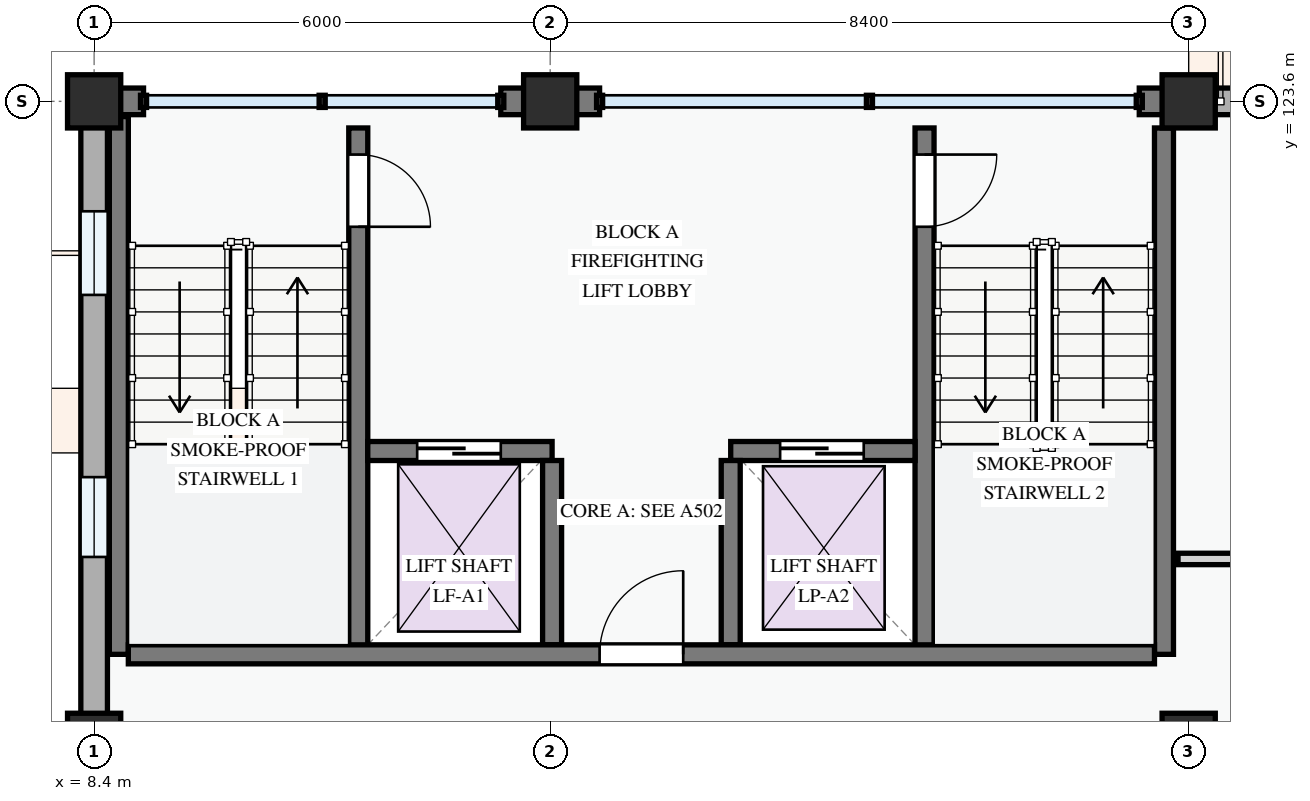
"""IFC4 building model, lengths in metres.
Left out: names, types, materials, properties, quantities, classifications, styles, units other than length and angle.
Written with IfcOpenShell. Run it as: python <this file> out.ifc"""

import sys

from ifc_helpers import new_model, si_unit, direction, frame, frame_2d, origin, origin_2d, place, context, subcontext, project, spatial, rectangle, extrude, element, fill, save


model = new_model("IFC4")
c1 = context("Model", 3, precision=1e-05, world=origin(), true_north=direction((0.0, 1.0)))
c2 = subcontext(c1, "Body", "Model", "MODEL_VIEW")
j1 = project(units=[si_unit("LENGTHUNIT", "METRE"), si_unit("PLANEANGLEUNIT", "RADIAN")], contexts=[c1])
p1 = place(None, origin())
s1 = spatial("IfcSite", under=j1, at=p1, CompositionType="ELEMENT")
p2 = place(p1, origin())
s2 = spatial("IfcBuilding", under=s1, at=p2, CompositionType="ELEMENT")
p3 = place(p2, frame((0.0, 0.0, 14.7)))
s3 = spatial("IfcBuildingStorey", under=s2, at=p3, CompositionType="ELEMENT", Elevation=14.7)
for number, where, z_axis, x_axis in (
    (1, (8.4, 115.2, 0.0), (0.0, 0.0, 1.0), (1.0, 0.0, 0.0)),
    (2, (8.4, 123.6, 0.0), (0.0, 0.0, 1.0), (1.0, 0.0, 0.0)),
    (3, (14.4, 123.6, 0.0), (0.0, 0.0, 1.0), (1.0, 0.0, 0.0)),
    (4, (22.8, 115.2, 0.0), (0.0, 0.0, 1.0), (1.0, 0.0, 0.0)),
    (5, (22.8, 123.6, 0.0), (0.0, 0.0, 1.0), (1.0, 0.0, 0.0)),
):
    element("IfcColumn", number, at=place(p3, frame(where, z_axis=z_axis, x_axis=x_axis)), inside=s3, PredefinedType="COLUMN", context=c2, shape_type="SweptSolid", body=[
        extrude(rectangle(XDim=0.7, YDim=0.7, at=origin_2d()), origin(), (0.0, 0.0, 1.0), 3.3),
    ])
p4 = place(p3, frame((28.8, 123.6, 0.0), z_axis=(0.0, 0.0, 1.0), x_axis=(-1.0, 0.0, 0.0)))
e6 = element("IfcWall", 6, at=p4, inside=s3, PredefinedType="STANDARD", context=c2, shape_type="SweptSolid", body=[
    extrude(rectangle(XDim=6.0, YDim=0.35, at=frame_2d((3.0, 0.0))), origin(), (0.0, 0.0, 1.0), 2.445),
])
p5 = place(p4, frame((0.62, 0.0, 0.0)))
e7 = element("IfcOpeningElement", 7, at=p5, cuts=e6, PredefinedType="OPENING", context=c2, shape_type="SweptSolid", body=[
    extrude(rectangle(XDim=1.1, YDim=2.15, at=frame_2d((0.55, 1.075))), frame((0.0, 0.185, 0.0), z_axis=(0.0, -1.0, 0.0), x_axis=(1.0, 0.0, 0.0)), (0.0, 0.0, 1.0), 0.37),
])
p6 = place(p4, frame((2.95, 0.0, 0.78)))
e8 = element("IfcOpeningElement", 8, at=p6, cuts=e6, PredefinedType="OPENING", context=c2, shape_type="SweptSolid", body=[
    extrude(rectangle(XDim=1.68, YDim=1.46, at=frame_2d((0.84, 0.73))), frame((0.0, 0.185, 0.0), z_axis=(0.0, -1.0, 0.0), x_axis=(1.0, 0.0, 0.0)), (0.0, 0.0, 1.0), 0.37),
])
for number, where, z_axis, x_axis in (
    (9, (22.8, 123.6, 0.0), (0.0, 0.0, 1.0), (-1.0, 0.0, 0.0)),
    (10, (15.05, 123.6, 0.0), (0.0, 0.0, 1.0), (-1.0, 0.0, 0.0)),
):
    element("IfcWall", number, at=place(p3, frame(where, z_axis=z_axis, x_axis=x_axis)), inside=s3, PredefinedType="STANDARD", context=c2, shape_type="SweptSolid", body=[
        extrude(rectangle(XDim=0.65, YDim=0.35, at=frame_2d((0.325, 0.0))), origin(), (0.0, 0.0, 1.0), 3.04),
    ])
p7 = place(p3, frame((14.4, 123.6, 0.0), z_axis=(0.0, 0.0, 1.0), x_axis=(-1.0, 0.0, 0.0)))
e11 = element("IfcWall", 11, at=p7, inside=s3, PredefinedType="STANDARD", context=c2, shape_type="SweptSolid", body=[
    extrude(rectangle(XDim=0.65, YDim=0.35, at=frame_2d((0.325, 0.0))), origin(), (0.0, 0.0, 1.0), 3.04),
])
p8 = place(p3, frame((9.05, 123.6, 0.0), z_axis=(0.0, 0.0, 1.0), x_axis=(-1.0, 0.0, 0.0)))
e12 = element("IfcWall", 12, at=p8, inside=s3, PredefinedType="STANDARD", context=c2, shape_type="SweptSolid", body=[
    extrude(rectangle(XDim=0.473, YDim=0.35, at=frame_2d((0.237, 0.0))), origin(), (0.0, 0.0, 1.0), 3.04),
])
p9 = place(p3, frame((8.4, 123.6, 0.0), z_axis=(0.0, 0.0, 1.0), x_axis=(0.0, -1.0, 0.0)))
e13 = element("IfcWall", 13, at=p9, inside=s3, PredefinedType="STANDARD", context=c2, shape_type="SweptSolid", body=[
    extrude(rectangle(XDim=8.4, YDim=0.35, at=frame_2d((4.2, 0.0))), origin(), (0.0, 0.0, 1.0), 2.345),
])
p10 = place(p9, frame((1.446, 0.0, 0.78)))
e14 = element("IfcOpeningElement", 14, at=p10, cuts=e13, PredefinedType="OPENING", context=c2, shape_type="SweptSolid", body=[
    extrude(rectangle(XDim=1.1, YDim=1.3, at=frame_2d((0.55, 0.65))), frame((0.0, 0.185, 0.0), z_axis=(0.0, -1.0, 0.0), x_axis=(1.0, 0.0, 0.0)), (0.0, 0.0, 1.0), 0.37),
])
p11 = place(p9, frame((4.944, 0.0, 0.78)))
e15 = element("IfcOpeningElement", 15, at=p11, cuts=e13, PredefinedType="OPENING", context=c2, shape_type="SweptSolid", body=[
    extrude(rectangle(XDim=1.05, YDim=1.2, at=frame_2d((0.525, 0.6))), frame((0.0, 0.185, 0.0), z_axis=(0.0, -1.0, 0.0), x_axis=(1.0, 0.0, 0.0)), (0.0, 0.0, 1.0), 0.37),
])
p12 = place(p3, frame((11.875, 123.25, 0.0), z_axis=(0.0, 0.0, 1.0), x_axis=(0.0, -1.0, 0.0)))
e16 = element("IfcWall", 16, at=p12, inside=s3, PredefinedType="SHEAR", context=c2, shape_type="SweptSolid", body=[
    extrude(rectangle(XDim=6.925, YDim=0.25, at=frame_2d((3.462, 0.0))), origin(), (0.0, 0.0, 1.0), 3.0),
])
p13 = place(p12, frame((0.35, 0.0, 0.0)))
e17 = element("IfcOpeningElement", 17, at=p13, cuts=e16, PredefinedType="OPENING", context=c2, shape_type="SweptSolid", body=[
    extrude(rectangle(XDim=0.95, YDim=2.1, at=frame_2d((0.475, 1.05))), frame((0.0, 0.135, 0.0), z_axis=(0.0, -1.0, 0.0), x_axis=(1.0, 0.0, 0.0)), (0.0, 0.0, 1.0), 0.27),
])
p14 = place(p3, frame((8.725, 123.4, 0.0), z_axis=(0.0, 0.0, 1.0), x_axis=(0.0, -1.0, 0.0)))
e18 = element("IfcWall", 18, at=p14, inside=s3, PredefinedType="SHEAR", context=c2, shape_type="SweptSolid", body=[
    extrude(rectangle(XDim=7.075, YDim=0.25, at=frame_2d((3.538, 0.0))), origin(), (0.0, 0.0, 1.0), 3.0),
])
p15 = place(p3, frame((22.475, 123.25, 0.0), z_axis=(0.0, 0.0, 1.0), x_axis=(0.0, -1.0, 0.0)))
e19 = element("IfcWall", 19, at=p15, inside=s3, PredefinedType="SHEAR", context=c2, shape_type="SweptSolid", body=[
    extrude(rectangle(XDim=6.925, YDim=0.25, at=frame_2d((3.462, 0.0))), origin(), (0.0, 0.0, 1.0), 3.0),
])
p16 = place(p3, frame((19.325, 123.25, 0.0), z_axis=(0.0, 0.0, 1.0), x_axis=(0.0, -1.0, 0.0)))
e20 = element("IfcWall", 20, at=p16, inside=s3, PredefinedType="SHEAR", context=c2, shape_type="SweptSolid", body=[
    extrude(rectangle(XDim=6.925, YDim=0.25, at=frame_2d((3.462, 0.0))), origin(), (0.0, 0.0, 1.0), 3.0),
])
p17 = place(p16, frame((0.35, 0.0, 0.0)))
e21 = element("IfcOpeningElement", 21, at=p17, cuts=e20, PredefinedType="OPENING", context=c2, shape_type="SweptSolid", body=[
    extrude(rectangle(XDim=0.95, YDim=2.1, at=frame_2d((0.475, 1.05))), frame((0.0, 0.135, 0.0), z_axis=(0.0, -1.0, 0.0), x_axis=(1.0, 0.0, 0.0)), (0.0, 0.0, 1.0), 0.27),
])
p18 = place(p3, frame((12.0, 119.0, 0.0), z_axis=(0.0, 0.0, 1.0), x_axis=(1.0, 0.0, 0.0)))
e22 = element("IfcWall", 22, at=p18, inside=s3, PredefinedType="SHEAR", context=c2, shape_type="SweptSolid", body=[
    extrude(rectangle(XDim=2.425, YDim=0.25, at=frame_2d((1.212, 0.0))), origin(), (0.0, 0.0, 1.0), 3.0),
])
p19 = place(p18, frame((0.65, 0.0, 0.0)))
e23 = element("IfcOpeningElement", 23, at=p19, cuts=e22, PredefinedType="OPENING", context=c2, shape_type="SweptSolid", body=[
    extrude(rectangle(XDim=1.1, YDim=2.15, at=frame_2d((0.55, 1.075))), frame((0.0, 0.135, 0.0), z_axis=(0.0, -1.0, 0.0), x_axis=(1.0, 0.0, 0.0)), (0.0, 0.0, 1.0), 0.27),
])
p20 = place(p3, frame((16.775, 119.0, 0.0), z_axis=(0.0, 0.0, 1.0), x_axis=(1.0, 0.0, 0.0)))
e24 = element("IfcWall", 24, at=p20, inside=s3, PredefinedType="SHEAR", context=c2, shape_type="SweptSolid", body=[
    extrude(rectangle(XDim=2.425, YDim=0.25, at=frame_2d((1.212, 0.0))), origin(), (0.0, 0.0, 1.0), 3.0),
])
p21 = place(p20, frame((0.65, 0.0, 0.0)))
e25 = element("IfcOpeningElement", 25, at=p21, cuts=e24, PredefinedType="OPENING", context=c2, shape_type="SweptSolid", body=[
    extrude(rectangle(XDim=1.1, YDim=2.15, at=frame_2d((0.55, 1.075))), frame((0.0, 0.135, 0.0), z_axis=(0.0, -1.0, 0.0), x_axis=(1.0, 0.0, 0.0)), (0.0, 0.0, 1.0), 0.27),
])
for number, where, z_axis, x_axis in (
    (26, (14.425, 118.875, 0.0), (0.0, 0.0, 1.0), (0.0, -1.0, 0.0)),
    (27, (16.775, 118.875, 0.0), (0.0, 0.0, 1.0), (0.0, -1.0, 0.0)),
):
    element("IfcWall", number, at=place(p3, frame(where, z_axis=z_axis, x_axis=x_axis)), inside=s3, PredefinedType="SHEAR", context=c2, shape_type="SweptSolid", body=[
        extrude(rectangle(XDim=2.425, YDim=0.25, at=frame_2d((1.212, 0.0))), origin(), (0.0, 0.0, 1.0), 3.0),
    ])
p22 = place(p3, frame((8.85, 116.325, 0.0), z_axis=(0.0, 0.0, 1.0), x_axis=(1.0, 0.0, 0.0)))
e28 = element("IfcWall", 28, at=p22, inside=s3, PredefinedType="SHEAR", context=c2, shape_type="SweptSolid", body=[
    extrude(rectangle(XDim=13.5, YDim=0.25, at=frame_2d((6.75, 0.0))), origin(), (0.0, 0.0, 1.0), 3.0),
])
p23 = place(p22, frame((6.2, 0.0, 0.0)))
e29 = element("IfcOpeningElement", 29, at=p23, cuts=e28, PredefinedType="OPENING", context=c2, shape_type="SweptSolid", body=[
    extrude(rectangle(XDim=1.1, YDim=2.15, at=frame_2d((0.55, 1.075))), frame((0.0, 0.135, 0.0), z_axis=(0.0, -1.0, 0.0), x_axis=(1.0, 0.0, 0.0)), (0.0, 0.0, 1.0), 0.27),
])
p24 = place(p3, frame((22.66, 117.58, 0.0), z_axis=(0.0, 0.0, 1.0), x_axis=(1.0, 0.0, 0.0)))
e30 = element("IfcWall", 30, at=p24, inside=s3, PredefinedType="PARTITIONING", context=c2, shape_type="SweptSolid", body=[
    extrude(rectangle(XDim=34.763, YDim=0.15, at=frame_2d((17.382, 0.0))), origin(), (0.0, 0.0, 1.0), 3.0),
])
p25 = place(p24, frame((2.74, 0.0, 0.0)))
e31 = element("IfcOpeningElement", 31, at=p25, cuts=e30, PredefinedType="OPENING", context=c2, shape_type="SweptSolid", body=[
    extrude(rectangle(XDim=0.96, YDim=2.12, at=frame_2d((0.48, 1.06))), frame((0.0, 0.085, 0.0), z_axis=(0.0, -1.0, 0.0), x_axis=(1.0, 0.0, 0.0)), (0.0, 0.0, 1.0), 0.17),
])
p26 = place(p24, frame((16.285, 0.0, 0.0)))
e32 = element("IfcOpeningElement", 32, at=p26, cuts=e30, PredefinedType="OPENING", context=c2, shape_type="SweptSolid", body=[
    extrude(rectangle(XDim=0.92, YDim=2.1, at=frame_2d((0.46, 1.05))), frame((0.0, 0.085, 0.0), z_axis=(0.0, -1.0, 0.0), x_axis=(1.0, 0.0, 0.0)), (0.0, 0.0, 1.0), 0.17),
])
p27 = place(p24, frame((24.263, 0.0, 0.0)))
e33 = element("IfcOpeningElement", 33, at=p27, cuts=e30, PredefinedType="OPENING", context=c2, shape_type="SweptSolid", body=[
    extrude(rectangle(XDim=0.92, YDim=2.1, at=frame_2d((0.46, 1.05))), frame((0.0, 0.085, 0.0), z_axis=(0.0, -1.0, 0.0), x_axis=(1.0, 0.0, 0.0)), (0.0, 0.0, 1.0), 0.17),
])
p28 = place(p10, origin())
e34 = element("IfcWindow", 34, at=p28, inside=s3, PartitioningType="SINGLE_PANEL", PredefinedType="WINDOW", context=c2, shape_type="SweptSolid", body=[
    extrude(rectangle(XDim=1.1, YDim=1.3, at=frame_2d((0.55, 0.65))), frame((0.0, 0.03, 0.0), z_axis=(0.0, -1.0, 0.0), x_axis=(1.0, 0.0, 0.0)), (0.0, 0.0, 1.0), 0.06),
])
fill(e14, e34)
p29 = place(p11, origin())
e35 = element("IfcWindow", 35, at=p29, inside=s3, PartitioningType="SINGLE_PANEL", PredefinedType="WINDOW", context=c2, shape_type="SweptSolid", body=[
    extrude(rectangle(XDim=1.05, YDim=1.2, at=frame_2d((0.525, 0.6))), frame((0.0, 0.03, 0.0), z_axis=(0.0, -1.0, 0.0), x_axis=(1.0, 0.0, 0.0)), (0.0, 0.0, 1.0), 0.06),
])
fill(e15, e35)
p30 = place(p13, origin())
e36 = element("IfcDoor", 36, at=p30, inside=s3, OperationType="SINGLE_SWING_RIGHT", PredefinedType="DOOR", context=c2, shape_type="SweptSolid", body=[
    extrude(rectangle(XDim=0.95, YDim=2.1, at=frame_2d((0.475, 1.05))), frame((0.0, 0.025, 0.0), z_axis=(0.0, -1.0, 0.0), x_axis=(1.0, 0.0, 0.0)), (0.0, 0.0, 1.0), 0.05),
])
fill(e17, e36)
p31 = place(p17, origin())
e37 = element("IfcDoor", 37, at=p31, inside=s3, OperationType="SINGLE_SWING_LEFT", PredefinedType="DOOR", context=c2, shape_type="SweptSolid", body=[
    extrude(rectangle(XDim=0.95, YDim=2.1, at=frame_2d((0.475, 1.05))), frame((0.0, 0.025, 0.0), z_axis=(0.0, -1.0, 0.0), x_axis=(1.0, 0.0, 0.0)), (0.0, 0.0, 1.0), 0.05),
])
fill(e21, e37)
p32 = place(p19, origin())
e38 = element("IfcDoor", 38, at=p32, inside=s3, OperationType="SLIDING_TO_LEFT", PredefinedType="DOOR", context=c2, shape_type="SweptSolid", body=[
    extrude(rectangle(XDim=1.1, YDim=2.15, at=frame_2d((0.55, 1.075))), frame((0.0, 0.025, 0.0), z_axis=(0.0, -1.0, 0.0), x_axis=(1.0, 0.0, 0.0)), (0.0, 0.0, 1.0), 0.05),
])
fill(e23, e38)
p33 = place(p21, origin())
e39 = element("IfcDoor", 39, at=p33, inside=s3, OperationType="SLIDING_TO_LEFT", PredefinedType="DOOR", context=c2, shape_type="SweptSolid", body=[
    extrude(rectangle(XDim=1.1, YDim=2.15, at=frame_2d((0.55, 1.075))), frame((0.0, 0.025, 0.0), z_axis=(0.0, -1.0, 0.0), x_axis=(1.0, 0.0, 0.0)), (0.0, 0.0, 1.0), 0.05),
])
fill(e25, e39)
p34 = place(p23, origin())
e40 = element("IfcDoor", 40, at=p34, inside=s3, OperationType="SINGLE_SWING_RIGHT", PredefinedType="DOOR", context=c2, shape_type="SweptSolid", body=[
    extrude(rectangle(XDim=1.1, YDim=2.15, at=frame_2d((0.55, 1.075))), frame((0.0, 0.025, 0.0), z_axis=(0.0, -1.0, 0.0), x_axis=(1.0, 0.0, 0.0)), (0.0, 0.0, 1.0), 0.05),
])
fill(e29, e40)
save(model, sys.argv[1])
